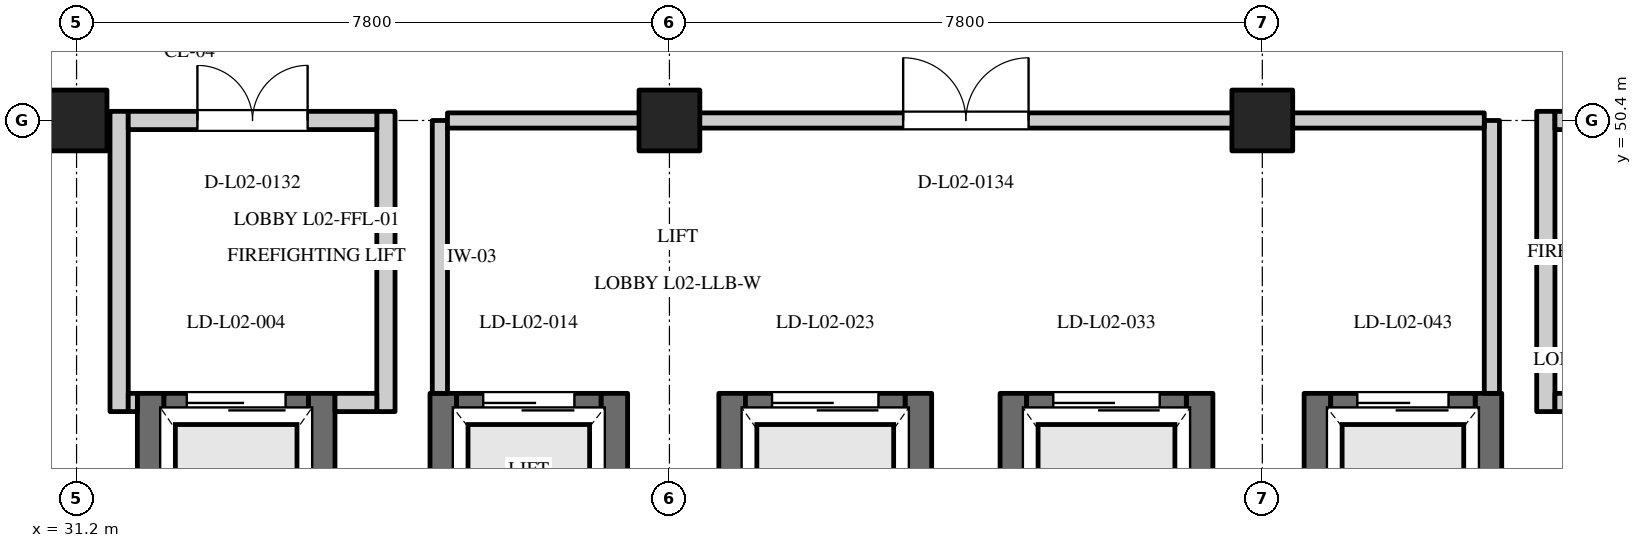
"""IFC4 building model, lengths in metres.
Left out: names, types, materials, properties, quantities, classifications, styles, units other than length and angle.
Written with IfcOpenShell. Run it as: python <this file> out.ifc"""

import sys

from ifc_helpers import new_model, si_unit, direction, frame, frame_2d, origin, origin_2d, place, context, subcontext, project, spatial, rectangle, extrude, element, fill, save


model = new_model("IFC4")
c1 = context("Model", 3, precision=1e-05, world=origin(), true_north=direction((0.0, 1.0)))
c2 = subcontext(c1, "Body", "Model", "MODEL_VIEW")
j1 = project(units=[si_unit("LENGTHUNIT", "METRE"), si_unit("PLANEANGLEUNIT", "RADIAN")], contexts=[c1])
p1 = place(None, origin())
s1 = spatial("IfcSite", under=j1, at=p1, CompositionType="ELEMENT")
p2 = place(p1, origin())
s2 = spatial("IfcBuilding", under=s1, at=p2, CompositionType="ELEMENT")
p3 = place(p2, frame((0.0, 0.0, 9.6)))
s3 = spatial("IfcBuildingStorey", under=s2, at=p3, CompositionType="ELEMENT", Elevation=9.6)
for number, where, z_axis, x_axis in (
    (1, (31.2, 50.4, 0.0), (0.0, 0.0, 1.0), (1.0, 0.0, 0.0)),
    (2, (39.0, 50.4, 0.0), (0.0, 0.0, 1.0), (1.0, 0.0, 0.0)),
    (3, (46.8, 50.4, 0.0), (0.0, 0.0, 1.0), (1.0, 0.0, 0.0)),
):
    element("IfcColumn", number, at=place(p3, frame(where, z_axis=z_axis, x_axis=x_axis)), inside=s3, PredefinedType="COLUMN", context=c2, shape_type="SweptSolid", body=[
        extrude(rectangle(XDim=0.8, YDim=0.8, at=origin_2d()), origin(), (0.0, 0.0, 1.0), 4.8),
    ])
for number, where, z_axis, x_axis in (
    (4, (32.175, 43.06, 0.0), (0.0, 0.0, 1.0), (0.0, 1.0, 0.0)),
    (5, (34.425, 43.06, 0.0), (0.0, 0.0, 1.0), (0.0, 1.0, 0.0)),
):
    element("IfcWall", number, at=place(p3, frame(where, z_axis=z_axis, x_axis=x_axis)), inside=s3, PredefinedType="SHEAR", context=c2, shape_type="SweptSolid", body=[
        extrude(rectangle(XDim=3.75, YDim=0.35, at=frame_2d((1.875, 0.0))), origin(), (0.0, 0.0, 1.0), 4.8),
    ])
p4 = place(p3, frame((32.35, 46.635, 0.0), z_axis=(0.0, 0.0, 1.0), x_axis=(1.0, 0.0, 0.0)))
e6 = element("IfcWall", 6, at=p4, inside=s3, PredefinedType="SHEAR", context=c2, shape_type="SweptSolid", body=[
    extrude(rectangle(XDim=1.9, YDim=0.35, at=frame_2d((0.95, 0.0))), origin(), (0.0, 0.0, 1.0), 4.5),
])
p5 = place(p4, frame((0.3, 0.0, 0.0)))
e7 = element("IfcOpeningElement", 7, at=p5, cuts=e6, PredefinedType="OPENING", context=c2, shape_type="SweptSolid", body=[
    extrude(rectangle(XDim=1.3, YDim=2.2, at=frame_2d((0.65, 1.1))), frame((0.0, 0.187, 0.0), z_axis=(0.0, -1.0, 0.0), x_axis=(1.0, 0.0, 0.0)), (0.0, 0.0, 1.0), 0.374),
])
for number, where, z_axis, x_axis in (
    (8, (36.025, 43.36, 0.0), (0.0, 0.0, 1.0), (0.0, 1.0, 0.0)),
    (9, (38.275, 43.36, 0.0), (0.0, 0.0, 1.0), (0.0, 1.0, 0.0)),
):
    element("IfcWall", number, at=place(p3, frame(where, z_axis=z_axis, x_axis=x_axis)), inside=s3, PredefinedType="SHEAR", context=c2, shape_type="SweptSolid", body=[
        extrude(rectangle(XDim=3.45, YDim=0.35, at=frame_2d((1.725, 0.0))), origin(), (0.0, 0.0, 1.0), 4.8),
    ])
p6 = place(p3, frame((36.2, 46.635, 0.0), z_axis=(0.0, 0.0, 1.0), x_axis=(1.0, 0.0, 0.0)))
e10 = element("IfcWall", 10, at=p6, inside=s3, PredefinedType="SHEAR", context=c2, shape_type="SweptSolid", body=[
    extrude(rectangle(XDim=1.9, YDim=0.35, at=frame_2d((0.95, 0.0))), origin(), (0.0, 0.0, 1.0), 4.5),
])
p7 = place(p6, frame((0.35, 0.0, 0.0)))
e11 = element("IfcOpeningElement", 11, at=p7, cuts=e10, PredefinedType="OPENING", context=c2, shape_type="SweptSolid", body=[
    extrude(rectangle(XDim=1.2, YDim=2.2, at=frame_2d((0.6, 1.1))), frame((0.0, 0.187, 0.0), z_axis=(0.0, -1.0, 0.0), x_axis=(1.0, 0.0, 0.0)), (0.0, 0.0, 1.0), 0.374),
])
for number, where, z_axis, x_axis in (
    (12, (39.825, 42.76, 0.0), (0.0, 0.0, 1.0), (0.0, 1.0, 0.0)),
    (13, (42.275, 42.76, 0.0), (0.0, 0.0, 1.0), (0.0, 1.0, 0.0)),
):
    element("IfcWall", number, at=place(p3, frame(where, z_axis=z_axis, x_axis=x_axis)), inside=s3, PredefinedType="SHEAR", context=c2, shape_type="SweptSolid", body=[
        extrude(rectangle(XDim=4.05, YDim=0.35, at=frame_2d((2.025, 0.0))), origin(), (0.0, 0.0, 1.0), 4.8),
    ])
p8 = place(p3, frame((40.0, 46.635, 0.0), z_axis=(0.0, 0.0, 1.0), x_axis=(1.0, 0.0, 0.0)))
e14 = element("IfcWall", 14, at=p8, inside=s3, PredefinedType="SHEAR", context=c2, shape_type="SweptSolid", body=[
    extrude(rectangle(XDim=2.1, YDim=0.35, at=frame_2d((1.05, 0.0))), origin(), (0.0, 0.0, 1.0), 4.5),
])
p9 = place(p8, frame((0.35, 0.0, 0.0)))
e15 = element("IfcOpeningElement", 15, at=p9, cuts=e14, PredefinedType="OPENING", context=c2, shape_type="SweptSolid", body=[
    extrude(rectangle(XDim=1.4, YDim=2.2, at=frame_2d((0.7, 1.1))), frame((0.0, 0.187, 0.0), z_axis=(0.0, -1.0, 0.0), x_axis=(1.0, 0.0, 0.0)), (0.0, 0.0, 1.0), 0.374),
])
for number, where, z_axis, x_axis in (
    (16, (43.525, 42.76, 0.0), (0.0, 0.0, 1.0), (0.0, 1.0, 0.0)),
    (17, (45.975, 42.76, 0.0), (0.0, 0.0, 1.0), (0.0, 1.0, 0.0)),
):
    element("IfcWall", number, at=place(p3, frame(where, z_axis=z_axis, x_axis=x_axis)), inside=s3, PredefinedType="SHEAR", context=c2, shape_type="SweptSolid", body=[
        extrude(rectangle(XDim=4.05, YDim=0.35, at=frame_2d((2.025, 0.0))), origin(), (0.0, 0.0, 1.0), 4.8),
    ])
p10 = place(p3, frame((43.7, 46.635, 0.0), z_axis=(0.0, 0.0, 1.0), x_axis=(1.0, 0.0, 0.0)))
e18 = element("IfcWall", 18, at=p10, inside=s3, PredefinedType="SHEAR", context=c2, shape_type="SweptSolid", body=[
    extrude(rectangle(XDim=2.1, YDim=0.35, at=frame_2d((1.05, 0.0))), origin(), (0.0, 0.0, 1.0), 4.5),
])
p11 = place(p10, frame((0.35, 0.0, 0.0)))
e19 = element("IfcOpeningElement", 19, at=p11, cuts=e18, PredefinedType="OPENING", context=c2, shape_type="SweptSolid", body=[
    extrude(rectangle(XDim=1.4, YDim=2.2, at=frame_2d((0.7, 1.1))), frame((0.0, 0.187, 0.0), z_axis=(0.0, -1.0, 0.0), x_axis=(1.0, 0.0, 0.0)), (0.0, 0.0, 1.0), 0.374),
])
for number, where, z_axis, x_axis in (
    (20, (47.525, 43.36, 0.0), (0.0, 0.0, 1.0), (0.0, 1.0, 0.0)),
    (21, (49.775, 43.36, 0.0), (0.0, 0.0, 1.0), (0.0, 1.0, 0.0)),
):
    element("IfcWall", number, at=place(p3, frame(where, z_axis=z_axis, x_axis=x_axis)), inside=s3, PredefinedType="SHEAR", context=c2, shape_type="SweptSolid", body=[
        extrude(rectangle(XDim=3.45, YDim=0.35, at=frame_2d((1.725, 0.0))), origin(), (0.0, 0.0, 1.0), 4.8),
    ])
p12 = place(p3, frame((47.7, 46.635, 0.0), z_axis=(0.0, 0.0, 1.0), x_axis=(1.0, 0.0, 0.0)))
e22 = element("IfcWall", 22, at=p12, inside=s3, PredefinedType="SHEAR", context=c2, shape_type="SweptSolid", body=[
    extrude(rectangle(XDim=1.9, YDim=0.35, at=frame_2d((0.95, 0.0))), origin(), (0.0, 0.0, 1.0), 4.5),
])
p13 = place(p12, frame((0.35, 0.0, 0.0)))
e23 = element("IfcOpeningElement", 23, at=p13, cuts=e22, PredefinedType="OPENING", context=c2, shape_type="SweptSolid", body=[
    extrude(rectangle(XDim=1.2, YDim=2.2, at=frame_2d((0.6, 1.1))), frame((0.0, 0.187, 0.0), z_axis=(0.0, -1.0, 0.0), x_axis=(1.0, 0.0, 0.0)), (0.0, 0.0, 1.0), 0.374),
])
for number, where, z_axis, x_axis in (
    (24, (31.76, 46.57, 0.0), (0.0, 0.0, 1.0), (0.0, 1.0, 0.0)),
    (25, (35.27, 46.57, 0.0), (0.0, 0.0, 1.0), (0.0, 1.0, 0.0)),
):
    element("IfcWall", number, at=place(p3, frame(where, z_axis=z_axis, x_axis=x_axis)), inside=s3, PredefinedType="STANDARD", context=c2, shape_type="SweptSolid", body=[
        extrude(rectangle(XDim=3.95, YDim=0.24, at=frame_2d((1.975, 0.0))), origin(), (0.0, 0.0, 1.0), 3.75),
    ])
p14 = place(p3, frame((31.88, 46.69, 0.0), z_axis=(0.0, 0.0, 1.0), x_axis=(1.0, 0.0, 0.0)))
e26 = element("IfcWall", 26, at=p14, inside=s3, PredefinedType="STANDARD", context=c2, shape_type="SweptSolid", body=[
    extrude(rectangle(XDim=0.12, YDim=0.24, at=frame_2d((0.06, 0.0))), origin(), (0.0, 0.0, 1.0), 3.75),
])
p15 = place(p3, frame((34.6, 46.69, 0.0), z_axis=(0.0, 0.0, 1.0), x_axis=(1.0, 0.0, 0.0)))
e27 = element("IfcWall", 27, at=p15, inside=s3, PredefinedType="STANDARD", context=c2, shape_type="SweptSolid", body=[
    extrude(rectangle(XDim=0.55, YDim=0.24, at=frame_2d((0.275, 0.0))), origin(), (0.0, 0.0, 1.0), 3.75),
])
p16 = place(p3, frame((31.88, 50.4, 0.0), z_axis=(0.0, 0.0, 1.0), x_axis=(1.0, 0.0, 0.0)))
e28 = element("IfcWall", 28, at=p16, inside=s3, PredefinedType="STANDARD", context=c2, shape_type="SweptSolid", body=[
    extrude(rectangle(XDim=3.27, YDim=0.24, at=frame_2d((1.635, 0.0))), origin(), (0.0, 0.0, 1.0), 3.75),
])
p17 = place(p16, frame((0.91, 0.0, 0.0)))
e29 = element("IfcOpeningElement", 29, at=p17, cuts=e28, PredefinedType="OPENING", context=c2, shape_type="SweptSolid", body=[
    extrude(rectangle(XDim=1.45, YDim=2.2, at=frame_2d((0.725, 1.1))), frame((0.0, 0.132, 0.0), z_axis=(0.0, -1.0, 0.0), x_axis=(1.0, 0.0, 0.0)), (0.0, 0.0, 1.0), 0.264),
])
p18 = place(p3, frame((50.53, 46.57, 0.0), z_axis=(0.0, 0.0, 1.0), x_axis=(0.0, 1.0, 0.0)))
e30 = element("IfcWall", 30, at=p18, inside=s3, PredefinedType="STANDARD", context=c2, shape_type="SweptSolid", body=[
    extrude(rectangle(XDim=3.95, YDim=0.24, at=frame_2d((1.975, 0.0))), origin(), (0.0, 0.0, 1.0), 3.75),
])
p19 = place(p3, frame((50.65, 46.69, 0.0), z_axis=(0.0, 0.0, 1.0), x_axis=(1.0, 0.0, 0.0)))
e31 = element("IfcWall", 31, at=p19, inside=s3, PredefinedType="STANDARD", context=c2, shape_type="SweptSolid", body=[
    extrude(rectangle(XDim=0.5, YDim=0.24, at=frame_2d((0.25, 0.0))), origin(), (0.0, 0.0, 1.0), 3.75),
])
p20 = place(p3, frame((50.65, 50.4, 0.0), z_axis=(0.0, 0.0, 1.0), x_axis=(1.0, 0.0, 0.0)))
e32 = element("IfcWall", 32, at=p20, inside=s3, PredefinedType="STANDARD", context=c2, shape_type="SweptSolid", body=[
    extrude(rectangle(XDim=3.37, YDim=0.24, at=frame_2d((1.685, 0.0))), origin(), (0.0, 0.0, 1.0), 3.75),
])
p21 = place(p20, frame((0.96, 0.0, 0.0)))
e33 = element("IfcOpeningElement", 33, at=p21, cuts=e32, PredefinedType="OPENING", context=c2, shape_type="SweptSolid", body=[
    extrude(rectangle(XDim=1.45, YDim=2.2, at=frame_2d((0.725, 1.1))), frame((0.0, 0.132, 0.0), z_axis=(0.0, -1.0, 0.0), x_axis=(1.0, 0.0, 0.0)), (0.0, 0.0, 1.0), 0.264),
])
for number, where, z_axis, x_axis in (
    (34, (35.98, 46.81, 0.0), (0.0, 0.0, 1.0), (0.0, 1.0, 0.0)),
    (35, (49.82, 46.81, 0.0), (0.0, 0.0, 1.0), (0.0, 1.0, 0.0)),
):
    element("IfcWall", number, at=place(p3, frame(where, z_axis=z_axis, x_axis=x_axis)), inside=s3, PredefinedType="STANDARD", context=c2, shape_type="SweptSolid", body=[
        extrude(rectangle(XDim=3.59, YDim=0.2, at=frame_2d((1.795, 0.0))), origin(), (0.0, 0.0, 1.0), 3.75),
    ])
p22 = place(p3, frame((36.08, 50.4, 0.0), z_axis=(0.0, 0.0, 1.0), x_axis=(1.0, 0.0, 0.0)))
e36 = element("IfcWall", 36, at=p22, inside=s3, PredefinedType="STANDARD", context=c2, shape_type="SweptSolid", body=[
    extrude(rectangle(XDim=13.64, YDim=0.2, at=frame_2d((6.82, 0.0))), origin(), (0.0, 0.0, 1.0), 3.75),
])
p23 = place(p22, frame((5.995, 0.0, 0.0)))
e37 = element("IfcOpeningElement", 37, at=p23, cuts=e36, PredefinedType="OPENING", context=c2, shape_type="SweptSolid", body=[
    extrude(rectangle(XDim=1.65, YDim=2.25, at=frame_2d((0.825, 1.125))), frame((0.0, 0.112, 0.0), z_axis=(0.0, -1.0, 0.0), x_axis=(1.0, 0.0, 0.0)), (0.0, 0.0, 1.0), 0.224),
])
p24 = place(p5, origin())
e38 = element("IfcDoor", 38, at=p24, inside=s3, OperationType="SLIDING_TO_LEFT", PredefinedType="DOOR", context=c2, shape_type="SweptSolid", body=[
    extrude(rectangle(XDim=1.3, YDim=2.2, at=frame_2d((0.65, 1.1))), frame((0.0, 0.025, 0.0), z_axis=(0.0, -1.0, 0.0), x_axis=(1.0, 0.0, 0.0)), (0.0, 0.0, 1.0), 0.05),
])
fill(e7, e38)
p25 = place(p7, origin())
e39 = element("IfcDoor", 39, at=p25, inside=s3, OperationType="SLIDING_TO_LEFT", PredefinedType="DOOR", context=c2, shape_type="SweptSolid", body=[
    extrude(rectangle(XDim=1.2, YDim=2.2, at=frame_2d((0.6, 1.1))), frame((0.0, 0.025, 0.0), z_axis=(0.0, -1.0, 0.0), x_axis=(1.0, 0.0, 0.0)), (0.0, 0.0, 1.0), 0.05),
])
fill(e11, e39)
p26 = place(p9, origin())
e40 = element("IfcDoor", 40, at=p26, inside=s3, OperationType="SLIDING_TO_LEFT", PredefinedType="DOOR", context=c2, shape_type="SweptSolid", body=[
    extrude(rectangle(XDim=1.4, YDim=2.2, at=frame_2d((0.7, 1.1))), frame((0.0, 0.025, 0.0), z_axis=(0.0, -1.0, 0.0), x_axis=(1.0, 0.0, 0.0)), (0.0, 0.0, 1.0), 0.05),
])
fill(e15, e40)
p27 = place(p11, origin())
e41 = element("IfcDoor", 41, at=p27, inside=s3, OperationType="SLIDING_TO_LEFT", PredefinedType="DOOR", context=c2, shape_type="SweptSolid", body=[
    extrude(rectangle(XDim=1.4, YDim=2.2, at=frame_2d((0.7, 1.1))), frame((0.0, 0.025, 0.0), z_axis=(0.0, -1.0, 0.0), x_axis=(1.0, 0.0, 0.0)), (0.0, 0.0, 1.0), 0.05),
])
fill(e19, e41)
p28 = place(p13, origin())
e42 = element("IfcDoor", 42, at=p28, inside=s3, OperationType="SLIDING_TO_LEFT", PredefinedType="DOOR", context=c2, shape_type="SweptSolid", body=[
    extrude(rectangle(XDim=1.2, YDim=2.2, at=frame_2d((0.6, 1.1))), frame((0.0, 0.025, 0.0), z_axis=(0.0, -1.0, 0.0), x_axis=(1.0, 0.0, 0.0)), (0.0, 0.0, 1.0), 0.05),
])
fill(e23, e42)
p29 = place(p17, origin())
e43 = element("IfcDoor", 43, at=p29, inside=s3, OperationType="DOUBLE_DOOR_SINGLE_SWING", PredefinedType="DOOR", context=c2, shape_type="SweptSolid", body=[
    extrude(rectangle(XDim=1.45, YDim=2.2, at=frame_2d((0.725, 1.1))), frame((0.0, 0.025, 0.0), z_axis=(0.0, -1.0, 0.0), x_axis=(1.0, 0.0, 0.0)), (0.0, 0.0, 1.0), 0.05),
])
fill(e29, e43)
p30 = place(p23, origin())
e44 = element("IfcDoor", 44, at=p30, inside=s3, OperationType="DOUBLE_DOOR_SINGLE_SWING", PredefinedType="DOOR", context=c2, shape_type="SweptSolid", body=[
    extrude(rectangle(XDim=1.65, YDim=2.25, at=frame_2d((0.825, 1.125))), frame((0.0, 0.025, 0.0), z_axis=(0.0, -1.0, 0.0), x_axis=(1.0, 0.0, 0.0)), (0.0, 0.0, 1.0), 0.05),
])
fill(e37, e44)
save(model, sys.argv[1])
